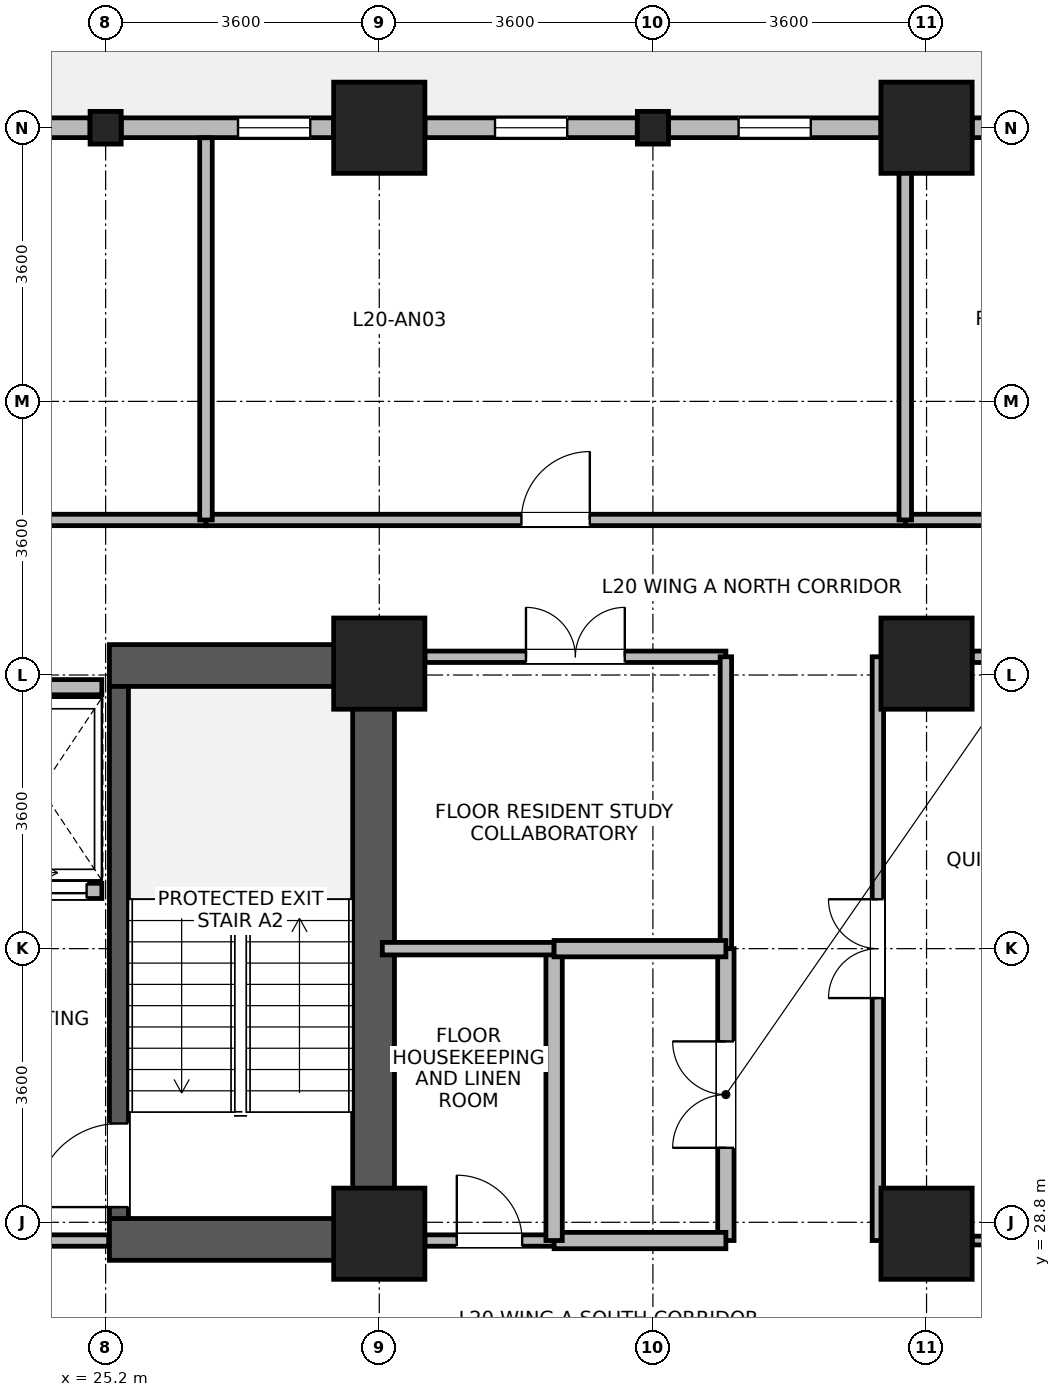
"""IFC4 building model, lengths in metres.
Left out: names, types, materials, properties, quantities, classifications, styles, units other than length and angle.
Written with IfcOpenShell. Run it as: python <this file> out.ifc"""

import sys

from ifc_helpers import new_model, si_unit, direction, frame, frame_2d, origin, origin_2d, place, context, subcontext, project, spatial, rectangle, i_section, extrude, source, transform, mapped, element, fill, save


model = new_model("IFC4")
c1 = context("Model", 3, precision=1e-05, world=origin(), true_north=direction((0.0, 1.0)))
c2 = subcontext(c1, "Body", "Model", "MODEL_VIEW")
j1 = project(units=[si_unit("LENGTHUNIT", "METRE"), si_unit("PLANEANGLEUNIT", "RADIAN")], contexts=[c1])
p1 = place(None, origin())
s1 = spatial("IfcSite", under=j1, at=p1, CompositionType="ELEMENT")
p2 = place(p1, origin())
s2 = spatial("IfcBuilding", under=s1, at=p2, CompositionType="ELEMENT")
p3 = place(p2, frame((0.0, 0.0, 82.3)))
s3 = spatial("IfcBuildingStorey", under=s2, at=p3, CompositionType="ELEMENT", Elevation=82.3)
p4 = place(p3, frame((28.725, 28.3, 0.0), z_axis=(0.0, 0.0, 1.0), x_axis=(0.0, 1.0, 0.0)))
e1 = element("IfcWall", 1, at=p4, inside=s3, PredefinedType="SHEAR", context=c2, shape_type="SweptSolid", body=[
    extrude(rectangle(XDim=8.1, YDim=0.55, at=frame_2d((4.05, 0.0))), origin(), (0.0, 0.0, 1.0), 3.45),
])
for number, where, z_axis, x_axis in (
    (2, (25.25, 28.575, 0.0), (0.0, 0.0, 1.0), (1.0, 0.0, 0.0)),
    (3, (25.25, 36.125, 0.0), (0.0, 0.0, 1.0), (1.0, 0.0, 0.0)),
):
    element("IfcWall", number, at=place(p3, frame(where, z_axis=z_axis, x_axis=x_axis)), inside=s3, PredefinedType="SHEAR", context=c2, shape_type="SweptSolid", body=[
        extrude(rectangle(XDim=3.2, YDim=0.55, at=frame_2d((1.6, 0.0))), origin(), (0.0, 0.0, 1.0), 3.45),
    ])
p5 = place(p3, frame((25.375, 28.85, 0.0), z_axis=(0.0, 0.0, 1.0), x_axis=(0.0, 1.0, 0.0)))
e4 = element("IfcWall", 4, at=p5, inside=s3, PredefinedType="SHEAR", context=c2, shape_type="SweptSolid", body=[
    extrude(rectangle(XDim=7.0, YDim=0.25, at=frame_2d((3.5, 0.0))), origin(), (0.0, 0.0, 1.0), 3.45),
])
p6 = place(p5, frame((0.15, 0.0, 0.0)))
e5 = element("IfcOpeningElement", 5, at=p6, cuts=e4, PredefinedType="OPENING", context=c2, shape_type="SweptSolid", body=[
    extrude(rectangle(XDim=1.1, YDim=2.08, at=frame_2d((0.55, 1.04))), frame((0.0, 0.135, 0.0), z_axis=(0.0, -1.0, 0.0), x_axis=(1.0, 0.0, 0.0)), (0.0, 0.0, 1.0), 0.27),
])
m1 = source(origin(), c2, "Body", "SweptSolid", [
    extrude(rectangle(XDim=1.2, YDim=1.2, at=origin_2d()), origin(), (0.0, 0.0, 1.0), 3.7),
])
for number, where, z_axis, x_axis in (
    (6, (28.8, 28.65, 0.0), (0.0, 0.0, 1.0), (1.0, 0.0, 0.0)),
    (7, (28.8, 36.15, 0.0), (0.0, 0.0, 1.0), (1.0, 0.0, 0.0)),
    (8, (28.8, 43.2, 0.0), (0.0, 0.0, 1.0), (1.0, 0.0, 0.0)),
    (9, (36.0, 43.2, 0.0), (0.0, 0.0, 1.0), (1.0, 0.0, 0.0)),
    (10, (36.0, 28.65, 0.0), (0.0, 0.0, 1.0), (1.0, 0.0, 0.0)),
    (11, (36.0, 36.15, 0.0), (0.0, 0.0, 1.0), (1.0, 0.0, 0.0)),
):
    element("IfcColumn", number, at=place(p3, frame(where, z_axis=z_axis, x_axis=x_axis)), inside=s3, PredefinedType="COLUMN", context=c2, shape_type="MappedRepresentation", body=[
        mapped(m1, transform((0.0, 0.0, 0.0), x_axis=(1.0, 0.0, 0.0), y_axis=(0.0, 1.0, 0.0), z_axis=(0.0, 0.0, 1.0), scale=1.0)),
    ])
m2 = source(origin(), c2, "Body", "SweptSolid", [
    extrude(i_section(OverallWidth=0.409, OverallDepth=0.43, WebThickness=0.024, FlangeThickness=0.033, FilletRadius=0.015, at=origin_2d()), origin(), (0.0, 0.0, 1.0), 3.7),
])
for number, where, z_axis, x_axis in (
    (12, (25.2, 43.2, 0.0), (0.0, 0.0, 1.0), (1.0, 0.0, 0.0)),
    (13, (32.4, 43.2, 0.0), (0.0, 0.0, 1.0), (1.0, 0.0, 0.0)),
):
    element("IfcColumn", number, at=place(p3, frame(where, z_axis=z_axis, x_axis=x_axis)), inside=s3, PredefinedType="COLUMN", context=c2, shape_type="MappedRepresentation", body=[
        mapped(m2, transform((0.0, 0.0, 0.0), x_axis=(1.0, 0.0, 0.0), y_axis=(0.0, 1.0, 0.0), z_axis=(0.0, 0.0, 1.0), scale=1.0)),
    ])
p7 = place(p3, frame((36.601, 43.2, 0.0), z_axis=(0.0, 0.0, 1.0), x_axis=(1.0, 0.0, 0.0)))
e14 = element("IfcWall", 14, at=p7, inside=s3, PredefinedType="STANDARD", context=c2, shape_type="SweptSolid", body=[
    extrude(rectangle(XDim=9.598, YDim=0.26, at=frame_2d((4.799, 0.0))), origin(), (0.0, 0.0, 1.0), 2.93),
])
p8 = place(p7, frame((0.7, 0.0, 0.85)))
e15 = element("IfcOpeningElement", 15, at=p8, cuts=e14, PredefinedType="OPENING", context=c2, shape_type="SweptSolid", body=[
    extrude(rectangle(XDim=1.8, YDim=1.85, at=frame_2d((0.9, 0.925))), frame((0.0, 0.14, 0.0), z_axis=(0.0, -1.0, 0.0), x_axis=(1.0, 0.0, 0.0)), (0.0, 0.0, 1.0), 0.28),
])
p9 = place(p7, frame((3.899, 0.0, 0.85)))
e16 = element("IfcOpeningElement", 16, at=p9, cuts=e14, PredefinedType="OPENING", context=c2, shape_type="SweptSolid", body=[
    extrude(rectangle(XDim=1.8, YDim=1.85, at=frame_2d((0.9, 0.925))), frame((0.0, 0.14, 0.0), z_axis=(0.0, -1.0, 0.0), x_axis=(1.0, 0.0, 0.0)), (0.0, 0.0, 1.0), 0.28),
])
p10 = place(p7, frame((7.098, 0.0, 0.85)))
e17 = element("IfcOpeningElement", 17, at=p10, cuts=e14, PredefinedType="OPENING", context=c2, shape_type="SweptSolid", body=[
    extrude(rectangle(XDim=1.8, YDim=1.85, at=frame_2d((0.9, 0.925))), frame((0.0, 0.14, 0.0), z_axis=(0.0, -1.0, 0.0), x_axis=(1.0, 0.0, 0.0)), (0.0, 0.0, 1.0), 0.28),
])
p11 = place(p3, frame((32.605, 43.2, 0.0), z_axis=(0.0, 0.0, 1.0), x_axis=(1.0, 0.0, 0.0)))
e18 = element("IfcWall", 18, at=p11, inside=s3, PredefinedType="STANDARD", context=c2, shape_type="SweptSolid", body=[
    extrude(rectangle(XDim=2.793, YDim=0.26, at=frame_2d((1.397, 0.0))), origin(), (0.0, 0.0, 1.0), 2.93),
])
p12 = place(p11, frame((0.922, 0.0, 0.85)))
e19 = element("IfcOpeningElement", 19, at=p12, cuts=e18, PredefinedType="OPENING", context=c2, shape_type="SweptSolid", body=[
    extrude(rectangle(XDim=0.95, YDim=1.75, at=frame_2d((0.475, 0.875))), frame((0.0, 0.14, 0.0), z_axis=(0.0, -1.0, 0.0), x_axis=(1.0, 0.0, 0.0)), (0.0, 0.0, 1.0), 0.28),
])
p13 = place(p3, frame((29.401, 43.2, 0.0), z_axis=(0.0, 0.0, 1.0), x_axis=(1.0, 0.0, 0.0)))
e20 = element("IfcWall", 20, at=p13, inside=s3, PredefinedType="STANDARD", context=c2, shape_type="SweptSolid", body=[
    extrude(rectangle(XDim=2.794, YDim=0.26, at=frame_2d((1.397, 0.0))), origin(), (0.0, 0.0, 1.0), 2.93),
])
p14 = place(p13, frame((0.922, 0.0, 0.85)))
e21 = element("IfcOpeningElement", 21, at=p14, cuts=e20, PredefinedType="OPENING", context=c2, shape_type="SweptSolid", body=[
    extrude(rectangle(XDim=0.95, YDim=1.75, at=frame_2d((0.475, 0.875))), frame((0.0, 0.14, 0.0), z_axis=(0.0, -1.0, 0.0), x_axis=(1.0, 0.0, 0.0)), (0.0, 0.0, 1.0), 0.28),
])
p15 = place(p3, frame((25.406, 43.2, 0.0), z_axis=(0.0, 0.0, 1.0), x_axis=(1.0, 0.0, 0.0)))
e22 = element("IfcWall", 22, at=p15, inside=s3, PredefinedType="STANDARD", context=c2, shape_type="SweptSolid", body=[
    extrude(rectangle(XDim=2.793, YDim=0.26, at=frame_2d((1.397, 0.0))), origin(), (0.0, 0.0, 1.0), 2.93),
])
p16 = place(p15, frame((1.536, 0.0, 0.85)))
e23 = element("IfcOpeningElement", 23, at=p16, cuts=e22, PredefinedType="OPENING", context=c2, shape_type="SweptSolid", body=[
    extrude(rectangle(XDim=0.95, YDim=1.75, at=frame_2d((0.475, 0.875))), frame((0.0, 0.14, 0.0), z_axis=(0.0, -1.0, 0.0), x_axis=(1.0, 0.0, 0.0)), (0.0, 0.0, 1.0), 0.28),
])
p17 = place(p3, frame((22.201, 43.2, 0.0), z_axis=(0.0, 0.0, 1.0), x_axis=(1.0, 0.0, 0.0)))
e24 = element("IfcWall", 24, at=p17, inside=s3, PredefinedType="STANDARD", context=c2, shape_type="SweptSolid", body=[
    extrude(rectangle(XDim=2.793, YDim=0.26, at=frame_2d((1.397, 0.0))), origin(), (0.0, 0.0, 1.0), 2.93),
])
p18 = place(p17, frame((0.922, 0.0, 0.85)))
e25 = element("IfcOpeningElement", 25, at=p18, cuts=e24, PredefinedType="OPENING", context=c2, shape_type="SweptSolid", body=[
    extrude(rectangle(XDim=0.95, YDim=1.75, at=frame_2d((0.475, 0.875))), frame((0.0, 0.14, 0.0), z_axis=(0.0, -1.0, 0.0), x_axis=(1.0, 0.0, 0.0)), (0.0, 0.0, 1.0), 0.28),
])
p19 = place(p3, frame((23.55, 33.16, 0.0), z_axis=(0.0, 0.0, 1.0), x_axis=(1.0, 0.0, 0.0)))
e26 = element("IfcWall", 26, at=p19, inside=s3, PredefinedType="PARTITIONING", context=c2, shape_type="SweptSolid", body=[
    extrude(rectangle(XDim=1.6, YDim=0.2, at=frame_2d((0.8, 0.0))), origin(), (0.0, 0.0, 1.0), 3.43),
])
p20 = place(p19, frame((0.2, 0.0, 0.0)))
e27 = element("IfcOpeningElement", 27, at=p20, cuts=e26, PredefinedType="OPENING", context=c2, shape_type="SweptSolid", body=[
    extrude(rectangle(XDim=1.2, YDim=2.12, at=frame_2d((0.6, 1.06))), frame((0.0, 0.11, 0.0), z_axis=(0.0, -1.0, 0.0), x_axis=(1.0, 0.0, 0.0)), (0.0, 0.0, 1.0), 0.22),
])
p21 = place(p3, frame((23.55, 35.84, 0.0), z_axis=(0.0, 0.0, 1.0), x_axis=(1.0, 0.0, 0.0)))
e28 = element("IfcWall", 28, at=p21, inside=s3, PredefinedType="PARTITIONING", context=c2, shape_type="SweptSolid", body=[
    extrude(rectangle(XDim=1.6, YDim=0.2, at=frame_2d((0.8, 0.0))), origin(), (0.0, 0.0, 1.0), 2.23),
])
p22 = place(p3, frame((35.72, 38.04, 0.0), z_axis=(0.0, 0.0, 1.0), x_axis=(1.0, 0.0, 0.0)))
e29 = element("IfcWall", 29, at=p22, inside=s3, PredefinedType="PARTITIONING", context=c2, shape_type="SweptSolid", body=[
    extrude(rectangle(XDim=10.72, YDim=0.15, at=frame_2d((5.36, 0.0))), origin(), (0.0, 0.0, 1.0), 3.43),
])
p23 = place(p22, frame((4.71, 0.0, 0.0)))
e30 = element("IfcOpeningElement", 30, at=p23, cuts=e29, PredefinedType="OPENING", context=c2, shape_type="SweptSolid", body=[
    extrude(rectangle(XDim=1.3, YDim=2.12, at=frame_2d((0.65, 1.06))), frame((0.0, 0.085, 0.0), z_axis=(0.0, -1.0, 0.0), x_axis=(1.0, 0.0, 0.0)), (0.0, 0.0, 1.0), 0.17),
])
p24 = place(p3, frame((16.44, 38.04, 0.0), z_axis=(0.0, 0.0, 1.0), x_axis=(1.0, 0.0, 0.0)))
e31 = element("IfcWall", 31, at=p24, inside=s3, PredefinedType="PARTITIONING", context=c2, shape_type="SweptSolid", body=[
    extrude(rectangle(XDim=10.08, YDim=0.15, at=frame_2d((5.04, 0.0))), origin(), (0.0, 0.0, 1.0), 3.43),
])
p25 = place(p24, frame((4.39, 0.0, 0.0)))
e32 = element("IfcOpeningElement", 32, at=p25, cuts=e31, PredefinedType="OPENING", context=c2, shape_type="SweptSolid", body=[
    extrude(rectangle(XDim=1.3, YDim=2.12, at=frame_2d((0.65, 1.06))), frame((0.0, 0.085, 0.0), z_axis=(0.0, -1.0, 0.0), x_axis=(1.0, 0.0, 0.0)), (0.0, 0.0, 1.0), 0.17),
])
p26 = place(p3, frame((26.52, 38.04, 0.0), z_axis=(0.0, 0.0, 1.0), x_axis=(1.0, 0.0, 0.0)))
e33 = element("IfcWall", 33, at=p26, inside=s3, PredefinedType="PARTITIONING", context=c2, shape_type="SweptSolid", body=[
    extrude(rectangle(XDim=9.2, YDim=0.15, at=frame_2d((4.6, 0.0))), origin(), (0.0, 0.0, 1.0), 3.43),
])
p27 = place(p26, frame((4.15, 0.0, 0.0)))
e34 = element("IfcOpeningElement", 34, at=p27, cuts=e33, PredefinedType="OPENING", context=c2, shape_type="SweptSolid", body=[
    extrude(rectangle(XDim=0.9, YDim=2.08, at=frame_2d((0.45, 1.04))), frame((0.0, 0.085, 0.0), z_axis=(0.0, -1.0, 0.0), x_axis=(1.0, 0.0, 0.0)), (0.0, 0.0, 1.0), 0.17),
])
p28 = place(p3, frame((35.36, 28.56, 0.0), z_axis=(0.0, 0.0, 1.0), x_axis=(0.0, 1.0, 0.0)))
e35 = element("IfcWall", 35, at=p28, inside=s3, PredefinedType="PARTITIONING", context=c2, shape_type="SweptSolid", body=[
    extrude(rectangle(XDim=7.68, YDim=0.15, at=frame_2d((3.84, 0.0))), origin(), (0.0, 0.0, 1.0), 3.43),
])
p29 = place(p28, frame((3.19, 0.0, 0.0)))
e36 = element("IfcOpeningElement", 36, at=p29, cuts=e35, PredefinedType="OPENING", context=c2, shape_type="SweptSolid", body=[
    extrude(rectangle(XDim=1.3, YDim=2.12, at=frame_2d((0.65, 1.06))), frame((0.0, 0.085, 0.0), z_axis=(0.0, -1.0, 0.0), x_axis=(1.0, 0.0, 0.0)), (0.0, 0.0, 1.0), 0.17),
])
p30 = place(p3, frame((36.6, 36.24, 0.0), z_axis=(0.0, 0.0, 1.0), x_axis=(1.0, 0.0, 0.0)))
e37 = element("IfcWall", 37, at=p30, inside=s3, PredefinedType="PARTITIONING", context=c2, shape_type="SweptSolid", body=[
    extrude(rectangle(XDim=4.56, YDim=0.15, at=frame_2d((2.28, 0.0))), origin(), (0.0, 0.0, 1.0), 2.78),
])
p31 = place(p3, frame((29.4, 36.24, 0.0), z_axis=(0.0, 0.0, 1.0), x_axis=(1.0, 0.0, 0.0)))
e38 = element("IfcWall", 38, at=p31, inside=s3, PredefinedType="PARTITIONING", context=c2, shape_type="SweptSolid", body=[
    extrude(rectangle(XDim=3.96, YDim=0.15, at=frame_2d((1.98, 0.0))), origin(), (0.0, 0.0, 1.0), 2.78),
])
p32 = place(p31, frame((1.33, 0.0, 0.0)))
e39 = element("IfcOpeningElement", 39, at=p32, cuts=e38, PredefinedType="OPENING", context=c2, shape_type="SweptSolid", body=[
    extrude(rectangle(XDim=1.3, YDim=2.12, at=frame_2d((0.65, 1.06))), frame((0.0, 0.085, 0.0), z_axis=(0.0, -1.0, 0.0), x_axis=(1.0, 0.0, 0.0)), (0.0, 0.0, 1.0), 0.17),
])
p33 = place(p3, frame((33.36, 32.4, 0.0), z_axis=(0.0, 0.0, 1.0), x_axis=(0.0, 1.0, 0.0)))
e40 = element("IfcWall", 40, at=p33, inside=s3, PredefinedType="PARTITIONING", context=c2, shape_type="SweptSolid", body=[
    extrude(rectangle(XDim=3.84, YDim=0.15, at=frame_2d((1.92, 0.0))), origin(), (0.0, 0.0, 1.0), 3.43),
])
p34 = place(p3, frame((33.36, 28.56, 0.0), z_axis=(0.0, 0.0, 1.0), x_axis=(0.0, 1.0, 0.0)))
e41 = element("IfcWall", 41, at=p34, inside=s3, PredefinedType="PARTITIONING", context=c2, shape_type="SweptSolid", body=[
    extrude(rectangle(XDim=3.84, YDim=0.215, at=frame_2d((1.92, 0.0))), origin(), (0.0, 0.0, 1.0), 3.43),
])
p35 = place(p34, frame((1.22, 0.0, 0.0)))
e42 = element("IfcOpeningElement", 42, at=p35, cuts=e41, PredefinedType="OPENING", context=c2, shape_type="SweptSolid", body=[
    extrude(rectangle(XDim=1.4, YDim=2.15, at=frame_2d((0.7, 1.075))), frame((0.0, 0.118, 0.0), z_axis=(0.0, -1.0, 0.0), x_axis=(1.0, 0.0, 0.0)), (0.0, 0.0, 1.0), 0.235),
])
p36 = place(p3, frame((29.4, 28.56, 0.0), z_axis=(0.0, 0.0, 1.0), x_axis=(1.0, 0.0, 0.0)))
e43 = element("IfcWall", 43, at=p36, inside=s3, PredefinedType="PARTITIONING", context=c2, shape_type="SweptSolid", body=[
    extrude(rectangle(XDim=1.7, YDim=0.15, at=frame_2d((0.85, 0.0))), origin(), (0.0, 0.0, 1.0), 2.78),
])
p37 = place(p36, frame((0.42, 0.0, 0.0)))
e44 = element("IfcOpeningElement", 44, at=p37, cuts=e43, PredefinedType="OPENING", context=c2, shape_type="SweptSolid", body=[
    extrude(rectangle(XDim=0.86, YDim=2.02, at=frame_2d((0.43, 1.01))), frame((0.0, 0.085, 0.0), z_axis=(0.0, -1.0, 0.0), x_axis=(1.0, 0.0, 0.0)), (0.0, 0.0, 1.0), 0.17),
])
p38 = place(p3, frame((31.1, 28.56, 0.0), z_axis=(0.0, 0.0, 1.0), x_axis=(1.0, 0.0, 0.0)))
e45 = element("IfcWall", 45, at=p38, inside=s3, PredefinedType="PARTITIONING", context=c2, shape_type="SweptSolid", body=[
    extrude(rectangle(XDim=2.26, YDim=0.215, at=frame_2d((1.13, 0.0))), origin(), (0.0, 0.0, 1.0), 2.78),
])
p39 = place(p3, frame((36.6, 28.56, 0.0), z_axis=(0.0, 0.0, 1.0), x_axis=(1.0, 0.0, 0.0)))
e46 = element("IfcWall", 46, at=p39, inside=s3, PredefinedType="PARTITIONING", context=c2, shape_type="SweptSolid", body=[
    extrude(rectangle(XDim=4.56, YDim=0.115, at=frame_2d((2.28, 0.0))), origin(), (0.0, 0.0, 1.0), 2.78),
])
for number, where, z_axis, x_axis in (
    (47, (26.52, 38.04, 0.0), (0.0, 0.0, 1.0), (0.0, 1.0, 0.0)),
    (48, (35.72, 38.04, 0.0), (0.0, 0.0, 1.0), (0.0, 1.0, 0.0)),
):
    element("IfcWall", number, at=place(p3, frame(where, z_axis=z_axis, x_axis=x_axis)), inside=s3, PredefinedType="PARTITIONING", context=c2, shape_type="SweptSolid", body=[
        extrude(rectangle(XDim=5.028, YDim=0.165, at=frame_2d((2.514, 0.0))), origin(), (0.0, 0.0, 1.0), 3.43),
    ])
p40 = place(p3, frame((31.1, 28.56, 0.0), z_axis=(0.0, 0.0, 1.0), x_axis=(0.0, 1.0, 0.0)))
e49 = element("IfcWall", 49, at=p40, inside=s3, PredefinedType="PARTITIONING", context=c2, shape_type="SweptSolid", body=[
    extrude(rectangle(XDim=3.84, YDim=0.215, at=frame_2d((1.92, 0.0))), origin(), (0.0, 0.0, 1.0), 3.43),
])
p41 = place(p3, frame((21.76, 28.56, 0.0), z_axis=(0.0, 0.0, 1.0), x_axis=(1.0, 0.0, 0.0)))
e50 = element("IfcWall", 50, at=p41, inside=s3, PredefinedType="PARTITIONING", context=c2, shape_type="SweptSolid", body=[
    extrude(rectangle(XDim=3.48, YDim=0.15, at=frame_2d((1.74, 0.0))), origin(), (0.0, 0.0, 1.0), 2.23),
])
p42 = place(p41, frame((0.99, 0.0, 0.0)))
e51 = element("IfcOpeningElement", 51, at=p42, cuts=e50, PredefinedType="OPENING", context=c2, shape_type="SweptSolid", body=[
    extrude(rectangle(XDim=1.5, YDim=2.1, at=frame_2d((0.75, 1.05))), frame((0.0, 0.085, 0.0), z_axis=(0.0, -1.0, 0.0), x_axis=(1.0, 0.0, 0.0)), (0.0, 0.0, 1.0), 0.17),
])
p43 = place(p3, frame((28.84, 32.4, 0.0), z_axis=(0.0, 0.0, 1.0), x_axis=(1.0, 0.0, 0.0)))
e52 = element("IfcWall", 52, at=p43, inside=s3, PredefinedType="PARTITIONING", context=c2, shape_type="SweptSolid", body=[
    extrude(rectangle(XDim=2.26, YDim=0.165, at=frame_2d((1.13, 0.0))), origin(), (0.0, 0.0, 1.0), 3.43),
])
p44 = place(p3, frame((31.1, 32.4, 0.0), z_axis=(0.0, 0.0, 1.0), x_axis=(1.0, 0.0, 0.0)))
e53 = element("IfcWall", 53, at=p44, inside=s3, PredefinedType="PARTITIONING", context=c2, shape_type="SweptSolid", body=[
    extrude(rectangle(XDim=2.26, YDim=0.215, at=frame_2d((1.13, 0.0))), origin(), (0.0, 0.0, 1.0), 3.43),
])
p45 = place(p12, origin())
e54 = element("IfcWindow", 54, at=p45, inside=s3, PartitioningType="SINGLE_PANEL", PredefinedType="WINDOW", context=c2, shape_type="SweptSolid", body=[
    extrude(rectangle(XDim=0.95, YDim=1.75, at=frame_2d((0.475, 0.875))), frame((0.0, 0.03, 0.0), z_axis=(0.0, -1.0, 0.0), x_axis=(1.0, 0.0, 0.0)), (0.0, 0.0, 1.0), 0.06),
])
fill(e19, e54)
p46 = place(p14, origin())
e55 = element("IfcWindow", 55, at=p46, inside=s3, PartitioningType="SINGLE_PANEL", PredefinedType="WINDOW", context=c2, shape_type="SweptSolid", body=[
    extrude(rectangle(XDim=0.95, YDim=1.75, at=frame_2d((0.475, 0.875))), frame((0.0, 0.03, 0.0), z_axis=(0.0, -1.0, 0.0), x_axis=(1.0, 0.0, 0.0)), (0.0, 0.0, 1.0), 0.06),
])
fill(e21, e55)
p47 = place(p16, origin())
e56 = element("IfcWindow", 56, at=p47, inside=s3, PartitioningType="SINGLE_PANEL", PredefinedType="WINDOW", context=c2, shape_type="SweptSolid", body=[
    extrude(rectangle(XDim=0.95, YDim=1.75, at=frame_2d((0.475, 0.875))), frame((0.0, 0.03, 0.0), z_axis=(0.0, -1.0, 0.0), x_axis=(1.0, 0.0, 0.0)), (0.0, 0.0, 1.0), 0.06),
])
fill(e23, e56)
p48 = place(p6, origin())
e57 = element("IfcDoor", 57, at=p48, inside=s3, OperationType="SINGLE_SWING_LEFT", PredefinedType="DOOR", context=c2, shape_type="SweptSolid", body=[
    extrude(rectangle(XDim=1.1, YDim=2.08, at=frame_2d((0.55, 1.04))), frame((0.0, 0.025, 0.0), z_axis=(0.0, -1.0, 0.0), x_axis=(1.0, 0.0, 0.0)), (0.0, 0.0, 1.0), 0.05),
])
fill(e5, e57)
p49 = place(p20, origin())
e58 = element("IfcDoor", 58, at=p49, inside=s3, OperationType="SLIDING_TO_RIGHT", PredefinedType="DOOR", context=c2, shape_type="SweptSolid", body=[
    extrude(rectangle(XDim=1.2, YDim=2.12, at=frame_2d((0.6, 1.06))), frame((0.0, 0.025, 0.0), z_axis=(0.0, -1.0, 0.0), x_axis=(1.0, 0.0, 0.0)), (0.0, 0.0, 1.0), 0.05),
])
fill(e27, e58)
p50 = place(p27, origin())
e59 = element("IfcDoor", 59, at=p50, inside=s3, OperationType="SINGLE_SWING_RIGHT", PredefinedType="DOOR", context=c2, shape_type="SweptSolid", body=[
    extrude(rectangle(XDim=0.9, YDim=2.08, at=frame_2d((0.45, 1.04))), frame((0.0, 0.025, 0.0), z_axis=(0.0, -1.0, 0.0), x_axis=(1.0, 0.0, 0.0)), (0.0, 0.0, 1.0), 0.05),
])
fill(e34, e59)
p51 = place(p29, origin())
e60 = element("IfcDoor", 60, at=p51, inside=s3, OperationType="DOUBLE_DOOR_SINGLE_SWING", PredefinedType="DOOR", context=c2, shape_type="SweptSolid", body=[
    extrude(rectangle(XDim=1.3, YDim=2.12, at=frame_2d((0.65, 1.06))), frame((0.0, 0.025, 0.0), z_axis=(0.0, -1.0, 0.0), x_axis=(1.0, 0.0, 0.0)), (0.0, 0.0, 1.0), 0.05),
])
fill(e36, e60)
p52 = place(p32, origin())
e61 = element("IfcDoor", 61, at=p52, inside=s3, OperationType="DOUBLE_DOOR_SINGLE_SWING", PredefinedType="DOOR", context=c2, shape_type="SweptSolid", body=[
    extrude(rectangle(XDim=1.3, YDim=2.12, at=frame_2d((0.65, 1.06))), frame((0.0, 0.025, 0.0), z_axis=(0.0, -1.0, 0.0), x_axis=(1.0, 0.0, 0.0)), (0.0, 0.0, 1.0), 0.05),
])
fill(e39, e61)
p53 = place(p35, origin())
e62 = element("IfcDoor", 62, at=p53, inside=s3, OperationType="DOUBLE_DOOR_SINGLE_SWING", PredefinedType="DOOR", context=c2, shape_type="SweptSolid", body=[
    extrude(rectangle(XDim=1.4, YDim=2.15, at=frame_2d((0.7, 1.075))), frame((0.0, 0.025, 0.0), z_axis=(0.0, -1.0, 0.0), x_axis=(1.0, 0.0, 0.0)), (0.0, 0.0, 1.0), 0.05),
])
fill(e42, e62)
p54 = place(p37, origin())
e63 = element("IfcDoor", 63, at=p54, inside=s3, OperationType="SINGLE_SWING_LEFT", PredefinedType="DOOR", context=c2, shape_type="SweptSolid", body=[
    extrude(rectangle(XDim=0.86, YDim=2.02, at=frame_2d((0.43, 1.01))), frame((0.0, 0.025, 0.0), z_axis=(0.0, -1.0, 0.0), x_axis=(1.0, 0.0, 0.0)), (0.0, 0.0, 1.0), 0.05),
])
fill(e44, e63)
save(model, sys.argv[1])
